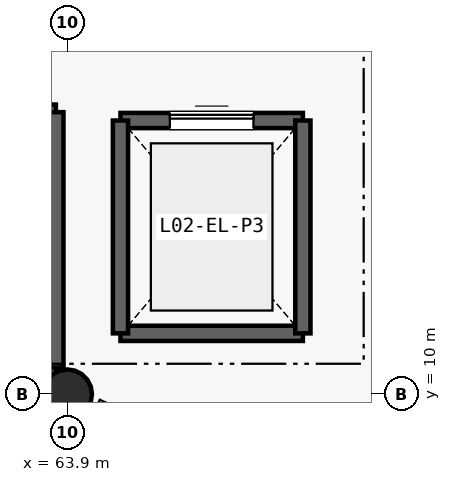
"""IFC4 building model, lengths in metres.
Left out: names, types, materials, properties, quantities, classifications, styles, units other than length and angle.
Written with IfcOpenShell. Run it as: python <this file> out.ifc"""

import sys

from ifc_helpers import new_model, si_unit, direction, frame, frame_2d, origin, origin_2d, place, context, subcontext, project, spatial, rectangle, circle, extrude, element, fill, save


model = new_model("IFC4")
c1 = context("Model", 3, precision=1e-05, world=origin(), true_north=direction((0.0, 1.0)))
c2 = subcontext(c1, "Body", "Model", "MODEL_VIEW")
j1 = project(units=[si_unit("LENGTHUNIT", "METRE"), si_unit("PLANEANGLEUNIT", "RADIAN")], contexts=[c1])
p1 = place(None, origin())
s1 = spatial("IfcSite", under=j1, at=p1, CompositionType="ELEMENT")
p2 = place(p1, origin())
s2 = spatial("IfcBuilding", under=s1, at=p2, CompositionType="ELEMENT")
p3 = place(p2, frame((0.0, 0.0, 8.4)))
s3 = spatial("IfcBuildingStorey", under=s2, at=p3, CompositionType="ELEMENT", Elevation=8.4)
p4 = place(p3, frame((63.9, 10.0, 0.0), z_axis=(0.0, 0.0, 1.0), x_axis=(1.0, 0.0, 0.0)))
e1 = element("IfcColumn", 1, at=p4, inside=s3, PredefinedType="COLUMN", context=c2, shape_type="SweptSolid", body=[
    extrude(circle(Radius=0.325, at=origin_2d()), origin(), (0.0, 0.0, 1.0), 4.2),
])
p5 = place(p3, frame((57.45, 10.35, 0.0), z_axis=(0.0, 0.0, 1.0), x_axis=(1.0, 0.0, 0.0)))
e2 = element("IfcWall", 2, at=p5, inside=s3, PredefinedType="SHEAR", context=c2, shape_type="SweptSolid", body=[
    extrude(rectangle(XDim=6.3, YDim=0.2, at=frame_2d((3.15, 0.0))), origin(), (0.0, 0.0, 1.0), 4.2),
])
p6 = place(p3, frame((57.45, 13.71, 0.0), z_axis=(0.0, 0.0, 1.0), x_axis=(1.0, 0.0, 0.0)))
e3 = element("IfcWall", 3, at=p6, inside=s3, PredefinedType="SHEAR", context=c2, shape_type="SweptSolid", body=[
    extrude(rectangle(XDim=6.3, YDim=0.2, at=frame_2d((3.15, 0.0))), origin(), (0.0, 0.0, 1.0), 4.2),
])
p7 = place(p6, frame((0.32, 0.0, 0.0)))
e4 = element("IfcOpeningElement", 4, at=p7, cuts=e3, PredefinedType="OPENING", context=c2, shape_type="SweptSolid", body=[
    extrude(rectangle(XDim=1.2, YDim=2.15, at=frame_2d((0.6, 1.075))), frame((0.0, 0.11, 0.0), z_axis=(0.0, -1.0, 0.0), x_axis=(1.0, 0.0, 0.0)), (0.0, 0.0, 1.0), 0.22),
])
p8 = place(p3, frame((63.75, 10.35, 0.0), z_axis=(0.0, 0.0, 1.0), x_axis=(0.0, 1.0, 0.0)))
e5 = element("IfcWall", 5, at=p8, inside=s3, PredefinedType="SHEAR", context=c2, shape_type="SweptSolid", body=[
    extrude(rectangle(XDim=3.36, YDim=0.2, at=frame_2d((1.68, 0.0))), origin(), (0.0, 0.0, 1.0), 4.2),
])
p9 = place(p3, frame((64.6, 10.8, 0.0), z_axis=(0.0, 0.0, 1.0), x_axis=(1.0, 0.0, 0.0)))
e6 = element("IfcWall", 6, at=p9, inside=s3, PredefinedType="SHEAR", context=c2, shape_type="SweptSolid", body=[
    extrude(rectangle(XDim=2.4, YDim=0.2, at=frame_2d((1.2, 0.0))), origin(), (0.0, 0.0, 1.0), 4.2),
])
p10 = place(p3, frame((64.6, 13.6, 0.0), z_axis=(0.0, 0.0, 1.0), x_axis=(1.0, 0.0, 0.0)))
e7 = element("IfcWall", 7, at=p10, inside=s3, PredefinedType="SHEAR", context=c2, shape_type="SweptSolid", body=[
    extrude(rectangle(XDim=2.4, YDim=0.2, at=frame_2d((1.2, 0.0))), origin(), (0.0, 0.0, 1.0), 4.2),
])
p11 = place(p10, frame((0.65, 0.0, 0.0)))
e8 = element("IfcOpeningElement", 8, at=p11, cuts=e7, PredefinedType="OPENING", context=c2, shape_type="SweptSolid", body=[
    extrude(rectangle(XDim=1.1, YDim=2.15, at=frame_2d((0.55, 1.075))), frame((0.0, 0.11, 0.0), z_axis=(0.0, -1.0, 0.0), x_axis=(1.0, 0.0, 0.0)), (0.0, 0.0, 1.0), 0.22),
])
for number, where, z_axis, x_axis in (
    (9, (64.6, 10.8, 0.0), (0.0, 0.0, 1.0), (0.0, 1.0, 0.0)),
    (10, (67.0, 10.8, 0.0), (0.0, 0.0, 1.0), (0.0, 1.0, 0.0)),
):
    element("IfcWall", number, at=place(p3, frame(where, z_axis=z_axis, x_axis=x_axis)), inside=s3, PredefinedType="SHEAR", context=c2, shape_type="SweptSolid", body=[
        extrude(rectangle(XDim=2.8, YDim=0.2, at=frame_2d((1.4, 0.0))), origin(), (0.0, 0.0, 1.0), 4.2),
    ])
p12 = place(p11, origin())
e11 = element("IfcDoor", 11, at=p12, inside=s3, OperationType="SLIDING_TO_LEFT", PredefinedType="DOOR", context=c2, shape_type="SweptSolid", body=[
    extrude(rectangle(XDim=1.1, YDim=2.15, at=frame_2d((0.55, 1.075))), frame((0.0, 0.025, 0.0), z_axis=(0.0, -1.0, 0.0), x_axis=(1.0, 0.0, 0.0)), (0.0, 0.0, 1.0), 0.05),
])
fill(e8, e11)
save(model, sys.argv[1])
